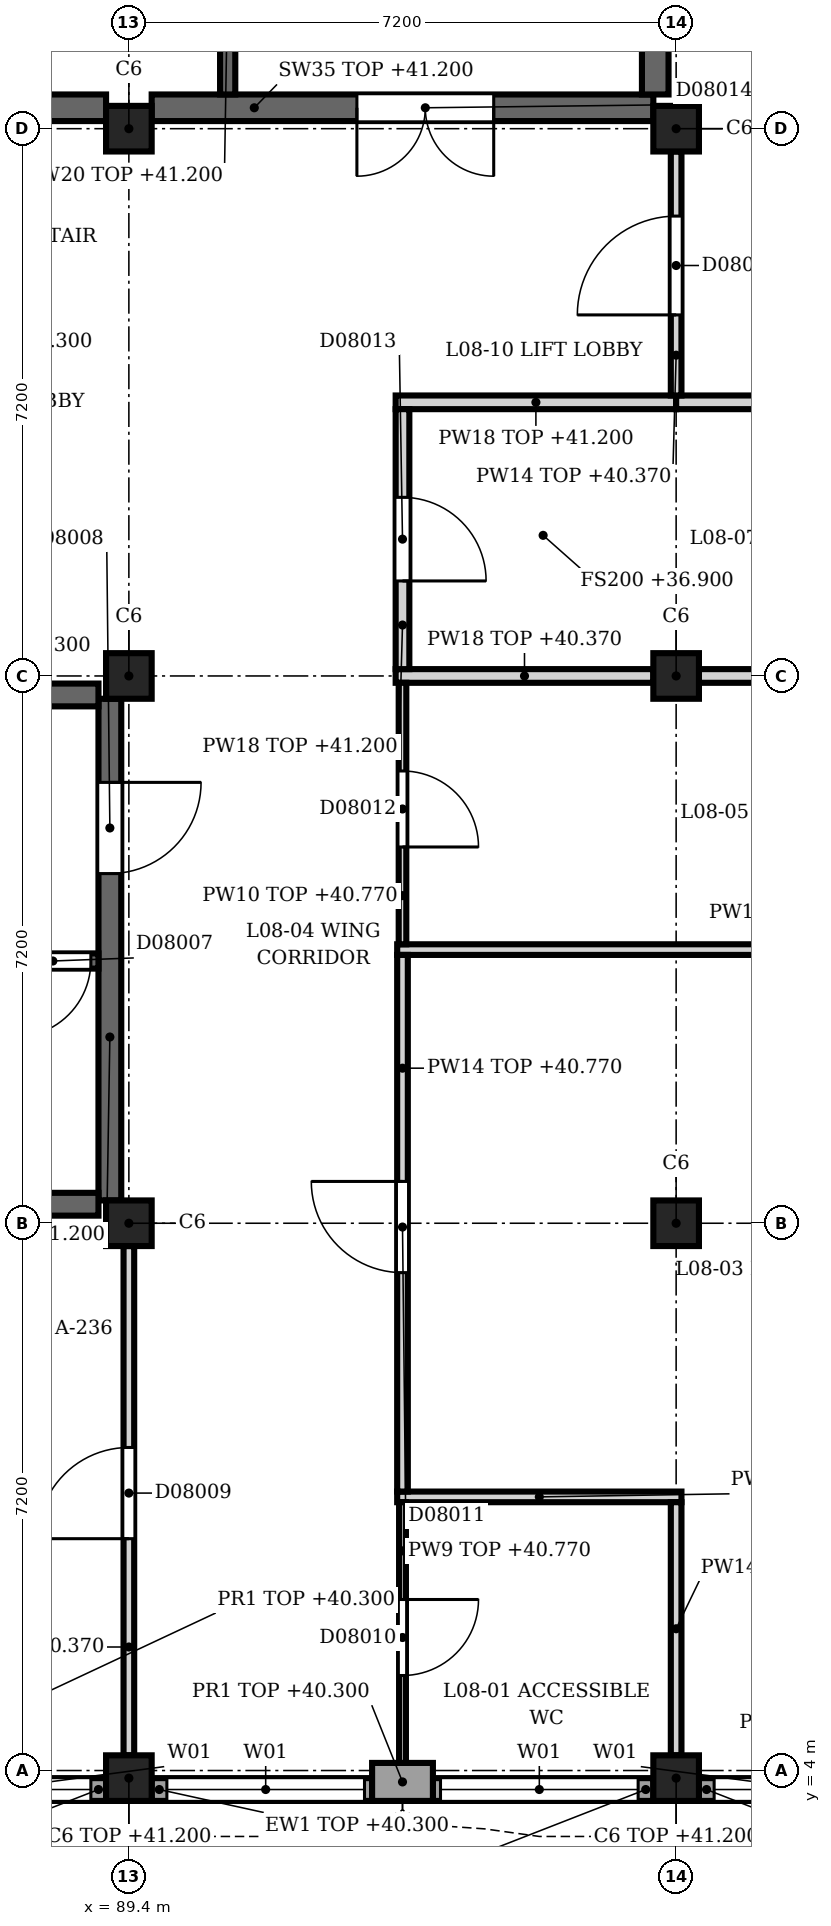
"""IFC4 building model, lengths in metres.
Left out: names, types, materials, properties, quantities, classifications, styles, units other than length and angle.
Written with IfcOpenShell. Run it as: python <this file> out.ifc"""

import sys

from ifc_helpers import new_model, si_unit, direction, frame, frame_2d, origin, origin_2d, place, context, subcontext, project, spatial, rectangle, extrude, element, fill, save


model = new_model("IFC4")
c1 = context("Model", 3, precision=1e-05, world=origin(), true_north=direction((0.0, 1.0)))
c2 = subcontext(c1, "Body", "Model", "MODEL_VIEW")
j1 = project(units=[si_unit("LENGTHUNIT", "METRE"), si_unit("PLANEANGLEUNIT", "RADIAN")], contexts=[c1])
p1 = place(None, origin())
s1 = spatial("IfcSite", under=j1, at=p1, CompositionType="ELEMENT")
p2 = place(p1, origin())
s2 = spatial("IfcBuilding", under=s1, at=p2, CompositionType="ELEMENT")
p3 = place(p2, frame((0.0, 0.0, 36.9)))
s3 = spatial("IfcBuildingStorey", under=s2, at=p3, CompositionType="ELEMENT", Elevation=36.9)
p4 = place(p3, frame((89.4, 3.9, 0.0), z_axis=(0.0, 0.0, 1.0), x_axis=(1.0, 0.0, 0.0)))
e1 = element("IfcColumn", 1, at=p4, inside=s3, PredefinedType="COLUMN", context=c2, shape_type="SweptSolid", body=[
    extrude(rectangle(XDim=0.6, YDim=0.6, at=origin_2d()), origin(), (0.0, 0.0, 1.0), 4.3),
])
for number, where, z_axis, x_axis in (
    (2, (89.4, 11.2, 0.0), (0.0, 0.0, 1.0), (1.0, 0.0, 0.0)),
    (3, (89.4, 18.4, 0.0), (0.0, 0.0, 1.0), (1.0, 0.0, 0.0)),
    (4, (89.4, 25.6, 0.0), (0.0, 0.0, 1.0), (1.0, 0.0, 0.0)),
):
    element("IfcColumn", number, at=place(p3, frame(where, z_axis=z_axis, x_axis=x_axis)), inside=s3, PredefinedType="COLUMN", context=c2, shape_type="SweptSolid", body=[
        extrude(rectangle(XDim=0.6, YDim=0.6, at=origin_2d()), origin(), (0.0, 0.0, 1.0), 4.5),
    ])
p5 = place(p3, frame((96.6, 3.9, 0.0), z_axis=(0.0, 0.0, 1.0), x_axis=(1.0, 0.0, 0.0)))
e5 = element("IfcColumn", 5, at=p5, inside=s3, PredefinedType="COLUMN", context=c2, shape_type="SweptSolid", body=[
    extrude(rectangle(XDim=0.6, YDim=0.6, at=origin_2d()), origin(), (0.0, 0.0, 1.0), 4.3),
])
for number, where, z_axis, x_axis in (
    (6, (96.6, 11.2, 0.0), (0.0, 0.0, 1.0), (1.0, 0.0, 0.0)),
    (7, (96.6, 18.4, 0.0), (0.0, 0.0, 1.0), (1.0, 0.0, 0.0)),
    (8, (96.6, 25.6, 0.0), (0.0, 0.0, 1.0), (1.0, 0.0, 0.0)),
):
    element("IfcColumn", number, at=place(p3, frame(where, z_axis=z_axis, x_axis=x_axis)), inside=s3, PredefinedType="COLUMN", context=c2, shape_type="SweptSolid", body=[
        extrude(rectangle(XDim=0.6, YDim=0.6, at=origin_2d()), origin(), (0.0, 0.0, 1.0), 4.5),
    ])
p6 = place(p3, frame((93.4, 3.85, 0.0), z_axis=(0.0, 0.0, 1.0), x_axis=(-1.0, 0.0, 0.0)))
e9 = element("IfcWall", 9, at=p6, inside=s3, PredefinedType="SOLIDWALL", context=c2, shape_type="SweptSolid", body=[
    extrude(rectangle(XDim=0.8, YDim=0.5, at=frame_2d((0.4, 0.0))), origin(), (0.0, 0.0, 1.0), 3.4),
])
p7 = place(p3, frame((99.8, 3.75, 0.0), z_axis=(0.0, 0.0, 1.0), x_axis=(-1.0, 0.0, 0.0)))
e10 = element("IfcWall", 10, at=p7, inside=s3, PredefinedType="SOLIDWALL", context=c2, shape_type="SweptSolid", body=[
    extrude(rectangle(XDim=2.9, YDim=0.3, at=frame_2d((1.45, 0.0))), origin(), (0.0, 0.0, 1.0), 3.4),
])
p8 = place(p7, frame((0.1, 0.0, 0.9)))
e11 = element("IfcOpeningElement", 11, at=p8, cuts=e10, PredefinedType="OPENING", context=c2, shape_type="SweptSolid", body=[
    extrude(rectangle(XDim=2.6, YDim=2.4, at=frame_2d((1.3, 1.2))), frame((0.0, 0.16, 0.0), z_axis=(0.0, -1.0, 0.0), x_axis=(1.0, 0.0, 0.0)), (0.0, 0.0, 1.0), 0.32),
])
p9 = place(p3, frame((96.3, 3.75, 0.0), z_axis=(0.0, 0.0, 1.0), x_axis=(-1.0, 0.0, 0.0)))
e12 = element("IfcWall", 12, at=p9, inside=s3, PredefinedType="SOLIDWALL", context=c2, shape_type="SweptSolid", body=[
    extrude(rectangle(XDim=2.9, YDim=0.3, at=frame_2d((1.45, 0.0))), origin(), (0.0, 0.0, 1.0), 3.4),
])
p10 = place(p9, frame((0.2, 0.0, 0.9)))
e13 = element("IfcOpeningElement", 13, at=p10, cuts=e12, PredefinedType="OPENING", context=c2, shape_type="SweptSolid", body=[
    extrude(rectangle(XDim=2.6, YDim=2.4, at=frame_2d((1.3, 1.2))), frame((0.0, 0.16, 0.0), z_axis=(0.0, -1.0, 0.0), x_axis=(1.0, 0.0, 0.0)), (0.0, 0.0, 1.0), 0.32),
])
p11 = place(p3, frame((92.6, 3.75, 0.0), z_axis=(0.0, 0.0, 1.0), x_axis=(-1.0, 0.0, 0.0)))
e14 = element("IfcWall", 14, at=p11, inside=s3, PredefinedType="SOLIDWALL", context=c2, shape_type="SweptSolid", body=[
    extrude(rectangle(XDim=2.9, YDim=0.3, at=frame_2d((1.45, 0.0))), origin(), (0.0, 0.0, 1.0), 3.4),
])
p12 = place(p11, frame((0.1, 0.0, 0.9)))
e15 = element("IfcOpeningElement", 15, at=p12, cuts=e14, PredefinedType="OPENING", context=c2, shape_type="SweptSolid", body=[
    extrude(rectangle(XDim=2.6, YDim=2.4, at=frame_2d((1.3, 1.2))), frame((0.0, 0.16, 0.0), z_axis=(0.0, -1.0, 0.0), x_axis=(1.0, 0.0, 0.0)), (0.0, 0.0, 1.0), 0.32),
])
p13 = place(p3, frame((89.1, 3.75, 0.0), z_axis=(0.0, 0.0, 1.0), x_axis=(-1.0, 0.0, 0.0)))
e16 = element("IfcWall", 16, at=p13, inside=s3, PredefinedType="SOLIDWALL", context=c2, shape_type="SweptSolid", body=[
    extrude(rectangle(XDim=2.9, YDim=0.3, at=frame_2d((1.45, 0.0))), origin(), (0.0, 0.0, 1.0), 3.4),
])
p14 = place(p13, frame((0.2, 0.0, 0.9)))
e17 = element("IfcOpeningElement", 17, at=p14, cuts=e16, PredefinedType="OPENING", context=c2, shape_type="SweptSolid", body=[
    extrude(rectangle(XDim=2.6, YDim=2.4, at=frame_2d((1.3, 1.2))), frame((0.0, 0.16, 0.0), z_axis=(0.0, -1.0, 0.0), x_axis=(1.0, 0.0, 0.0)), (0.0, 0.0, 1.0), 0.32),
])
p15 = place(p3, frame((82.4, 25.875, 0.0), z_axis=(0.0, 0.0, 1.0), x_axis=(1.0, 0.0, 0.0)))
e18 = element("IfcWall", 18, at=p15, inside=s3, PredefinedType="SHEAR", context=c2, shape_type="SweptSolid", body=[
    extrude(rectangle(XDim=6.7, YDim=0.35, at=frame_2d((3.35, 0.0))), origin(), (0.0, 0.0, 1.0), 4.3),
])
p16 = place(p15, frame((4.0, 0.0, 0.0)))
e19 = element("IfcOpeningElement", 19, at=p16, cuts=e18, PredefinedType="OPENING", context=c2, shape_type="SweptSolid", body=[
    extrude(rectangle(XDim=1.2, YDim=2.1, at=frame_2d((0.6, 1.05))), frame((0.0, 0.185, 0.0), z_axis=(0.0, -1.0, 0.0), x_axis=(1.0, 0.0, 0.0)), (0.0, 0.0, 1.0), 0.37),
])
p17 = place(p3, frame((89.7, 25.875, 0.0), z_axis=(0.0, 0.0, 1.0), x_axis=(1.0, 0.0, 0.0)))
e20 = element("IfcWall", 20, at=p17, inside=s3, PredefinedType="SHEAR", context=c2, shape_type="SweptSolid", body=[
    extrude(rectangle(XDim=6.6, YDim=0.35, at=frame_2d((3.3, 0.0))), origin(), (0.0, 0.0, 1.0), 4.3),
])
p18 = place(p17, frame((2.7, 0.0, 0.0)))
e21 = element("IfcOpeningElement", 21, at=p18, cuts=e20, PredefinedType="OPENING", context=c2, shape_type="SweptSolid", body=[
    extrude(rectangle(XDim=1.8, YDim=2.1, at=frame_2d((0.9, 1.05))), frame((0.0, 0.185, 0.0), z_axis=(0.0, -1.0, 0.0), x_axis=(1.0, 0.0, 0.0)), (0.0, 0.0, 1.0), 0.37),
])
p19 = place(p3, frame((96.325, 26.05, 0.0), z_axis=(0.0, 0.0, 1.0), x_axis=(0.0, 1.0, 0.0)))
e22 = element("IfcWall", 22, at=p19, inside=s3, PredefinedType="SHEAR", context=c2, shape_type="SweptSolid", body=[
    extrude(rectangle(XDim=6.3, YDim=0.35, at=frame_2d((3.15, 0.0))), origin(), (0.0, 0.0, 1.0), 4.3),
])
p20 = place(p3, frame((90.7, 26.05, 0.0), z_axis=(0.0, 0.0, 1.0), x_axis=(0.0, 1.0, 0.0)))
e23 = element("IfcWall", 23, at=p20, inside=s3, PredefinedType="SHEAR", context=c2, shape_type="SweptSolid", body=[
    extrude(rectangle(XDim=3.05, YDim=0.2, at=frame_2d((1.525, 0.0))), origin(), (0.0, 0.0, 1.0), 4.3),
])
p21 = place(p3, frame((89.15, 11.5, 0.0), z_axis=(0.0, 0.0, 1.0), x_axis=(0.0, 1.0, 0.0)))
e24 = element("IfcWall", 24, at=p21, inside=s3, PredefinedType="SHEAR", context=c2, shape_type="SweptSolid", body=[
    extrude(rectangle(XDim=6.6, YDim=0.3, at=frame_2d((3.3, 0.0))), origin(), (0.0, 0.0, 1.0), 4.3),
])
p22 = place(p21, frame((4.3, 0.0, 0.0)))
e25 = element("IfcOpeningElement", 25, at=p22, cuts=e24, PredefinedType="OPENING", context=c2, shape_type="SweptSolid", body=[
    extrude(rectangle(XDim=1.2, YDim=2.1, at=frame_2d((0.6, 1.05))), frame((0.0, 0.16, 0.0), z_axis=(0.0, -1.0, 0.0), x_axis=(1.0, 0.0, 0.0)), (0.0, 0.0, 1.0), 0.32),
])
for number, where, z_axis, x_axis in (
    (26, (82.6, 11.45, 0.0), (0.0, 0.0, 1.0), (1.0, 0.0, 0.0)),
    (27, (82.6, 18.15, 0.0), (0.0, 0.0, 1.0), (1.0, 0.0, 0.0)),
):
    element("IfcWall", number, at=place(p3, frame(where, z_axis=z_axis, x_axis=x_axis)), inside=s3, PredefinedType="SHEAR", context=c2, shape_type="SweptSolid", body=[
        extrude(rectangle(XDim=6.4, YDim=0.3, at=frame_2d((3.2, 0.0))), origin(), (0.0, 0.0, 1.0), 4.3),
    ])
p23 = place(p3, frame((89.0, 14.65, 0.0), z_axis=(0.0, 0.0, 1.0), x_axis=(-1.0, 0.0, 0.0)))
e28 = element("IfcWall", 28, at=p23, inside=s3, PredefinedType="SHEAR", context=c2, shape_type="SweptSolid", body=[
    extrude(rectangle(XDim=6.4, YDim=0.2, at=frame_2d((3.2, 0.0))), origin(), (0.0, 0.0, 1.0), 4.3),
])
p24 = place(p23, frame((0.1, 0.0, 0.0)))
e29 = element("IfcOpeningElement", 29, at=p24, cuts=e28, PredefinedType="OPENING", context=c2, shape_type="SweptSolid", body=[
    extrude(rectangle(XDim=1.0, YDim=2.1, at=frame_2d((0.5, 1.05))), frame((0.0, 0.11, 0.0), z_axis=(0.0, -1.0, 0.0), x_axis=(1.0, 0.0, 0.0)), (0.0, 0.0, 1.0), 0.22),
])
p25 = place(p3, frame((92.93, 7.6, 0.0), z_axis=(0.0, 0.0, 1.0), x_axis=(1.0, 0.0, 0.0)))
e30 = element("IfcWall", 30, at=p25, inside=s3, PredefinedType="PARTITIONING", context=c2, shape_type="SweptSolid", body=[
    extrude(rectangle(XDim=3.74, YDim=0.14, at=frame_2d((1.87, 0.0))), origin(), (0.0, 0.0, 1.0), 4.3),
])
p26 = place(p3, frame((92.93, 14.8, 0.0), z_axis=(0.0, 0.0, 1.0), x_axis=(1.0, 0.0, 0.0)))
e31 = element("IfcWall", 31, at=p26, inside=s3, PredefinedType="PARTITIONING", context=c2, shape_type="SweptSolid", body=[
    extrude(rectangle(XDim=10.77, YDim=0.14, at=frame_2d((5.385, 0.0))), origin(), (0.0, 0.0, 1.0), 4.3),
])
p27 = place(p3, frame((92.91, 18.4, 0.0), z_axis=(0.0, 0.0, 1.0), x_axis=(1.0, 0.0, 0.0)))
e32 = element("IfcWall", 32, at=p27, inside=s3, PredefinedType="PARTITIONING", context=c2, shape_type="SweptSolid", body=[
    extrude(rectangle(XDim=3.39, YDim=0.18, at=frame_2d((1.695, 0.0))), origin(), (0.0, 0.0, 1.0), 3.47),
])
p28 = place(p3, frame((96.9, 18.4, 0.0), z_axis=(0.0, 0.0, 1.0), x_axis=(1.0, 0.0, 0.0)))
e33 = element("IfcWall", 33, at=p28, inside=s3, PredefinedType="PARTITIONING", context=c2, shape_type="SweptSolid", body=[
    extrude(rectangle(XDim=6.7, YDim=0.18, at=frame_2d((3.35, 0.0))), origin(), (0.0, 0.0, 1.0), 3.47),
])
p29 = place(p3, frame((92.91, 22.0, 0.0), z_axis=(0.0, 0.0, 1.0), x_axis=(1.0, 0.0, 0.0)))
e34 = element("IfcWall", 34, at=p29, inside=s3, PredefinedType="PARTITIONING", context=c2, shape_type="SweptSolid", body=[
    extrude(rectangle(XDim=3.69, YDim=0.18, at=frame_2d((1.845, 0.0))), origin(), (0.0, 0.0, 1.0), 4.3),
])
p30 = place(p3, frame((96.6, 22.0, 0.0), z_axis=(0.0, 0.0, 1.0), x_axis=(1.0, 0.0, 0.0)))
e35 = element("IfcWall", 35, at=p30, inside=s3, PredefinedType="PARTITIONING", context=c2, shape_type="SweptSolid", body=[
    extrude(rectangle(XDim=7.1, YDim=0.18, at=frame_2d((3.55, 0.0))), origin(), (0.0, 0.0, 1.0), 4.3),
])
p31 = place(p3, frame((89.4, 4.2, 0.0), z_axis=(0.0, 0.0, 1.0), x_axis=(0.0, 1.0, 0.0)))
e36 = element("IfcWall", 36, at=p31, inside=s3, PredefinedType="PARTITIONING", context=c2, shape_type="SweptSolid", body=[
    extrude(rectangle(XDim=6.7, YDim=0.14, at=frame_2d((3.35, 0.0))), origin(), (0.0, 0.0, 1.0), 3.47),
])
p32 = place(p31, frame((2.85, 0.0, 0.0)))
e37 = element("IfcOpeningElement", 37, at=p32, cuts=e36, PredefinedType="OPENING", context=c2, shape_type="SweptSolid", body=[
    extrude(rectangle(XDim=1.2, YDim=2.1, at=frame_2d((0.6, 1.05))), frame((0.0, 0.08, 0.0), z_axis=(0.0, -1.0, 0.0), x_axis=(1.0, 0.0, 0.0)), (0.0, 0.0, 1.0), 0.16),
])
p33 = place(p3, frame((93.0, 7.53, 0.0), z_axis=(0.0, 0.0, 1.0), x_axis=(0.0, -1.0, 0.0)))
e38 = element("IfcWall", 38, at=p33, inside=s3, PredefinedType="PARTITIONING", context=c2, shape_type="SweptSolid", body=[
    extrude(rectangle(XDim=3.43, YDim=0.09, at=frame_2d((1.715, 0.0))), origin(), (0.0, 0.0, 1.0), 3.87),
])
p34 = place(p33, frame((1.28, 0.0, 0.0)))
e39 = element("IfcOpeningElement", 39, at=p34, cuts=e38, PredefinedType="OPENING", context=c2, shape_type="SweptSolid", body=[
    extrude(rectangle(XDim=1.0, YDim=2.2, at=frame_2d((0.5, 1.1))), frame((0.0, 0.055, 0.0), z_axis=(0.0, -1.0, 0.0), x_axis=(1.0, 0.0, 0.0)), (0.0, 0.0, 1.0), 0.11),
])
p35 = place(p3, frame((93.0, 14.73, 0.0), z_axis=(0.0, 0.0, 1.0), x_axis=(0.0, -1.0, 0.0)))
e40 = element("IfcWall", 40, at=p35, inside=s3, PredefinedType="PARTITIONING", context=c2, shape_type="SweptSolid", body=[
    extrude(rectangle(XDim=7.06, YDim=0.14, at=frame_2d((3.53, 0.0))), origin(), (0.0, 0.0, 1.0), 3.87),
])
p36 = place(p35, frame((2.98, 0.0, 0.0)))
e41 = element("IfcOpeningElement", 41, at=p36, cuts=e40, PredefinedType="OPENING", context=c2, shape_type="SweptSolid", body=[
    extrude(rectangle(XDim=1.2, YDim=2.1, at=frame_2d((0.6, 1.05))), frame((0.0, 0.08, 0.0), z_axis=(0.0, -1.0, 0.0), x_axis=(1.0, 0.0, 0.0)), (0.0, 0.0, 1.0), 0.16),
])
p37 = place(p3, frame((93.0, 18.31, 0.0), z_axis=(0.0, 0.0, 1.0), x_axis=(0.0, -1.0, 0.0)))
e42 = element("IfcWall", 42, at=p37, inside=s3, PredefinedType="PARTITIONING", context=c2, shape_type="SweptSolid", body=[
    extrude(rectangle(XDim=3.44, YDim=0.1, at=frame_2d((1.72, 0.0))), origin(), (0.0, 0.0, 1.0), 3.87),
])
p38 = place(p37, frame((1.16, 0.0, 0.0)))
e43 = element("IfcOpeningElement", 43, at=p38, cuts=e42, PredefinedType="OPENING", context=c2, shape_type="SweptSolid", body=[
    extrude(rectangle(XDim=1.0, YDim=2.1, at=frame_2d((0.5, 1.05))), frame((0.0, 0.06, 0.0), z_axis=(0.0, -1.0, 0.0), x_axis=(1.0, 0.0, 0.0)), (0.0, 0.0, 1.0), 0.12),
])
p39 = place(p3, frame((93.0, 21.91, 0.0), z_axis=(0.0, 0.0, 1.0), x_axis=(0.0, -1.0, 0.0)))
e44 = element("IfcWall", 44, at=p39, inside=s3, PredefinedType="PARTITIONING", context=c2, shape_type="SweptSolid", body=[
    extrude(rectangle(XDim=3.42, YDim=0.18, at=frame_2d((1.71, 0.0))), origin(), (0.0, 0.0, 1.0), 4.3),
])
p40 = place(p39, frame((1.16, 0.0, 0.0)))
e45 = element("IfcOpeningElement", 45, at=p40, cuts=e44, PredefinedType="OPENING", context=c2, shape_type="SweptSolid", body=[
    extrude(rectangle(XDim=1.1, YDim=2.3, at=frame_2d((0.55, 1.15))), frame((0.0, 0.1, 0.0), z_axis=(0.0, -1.0, 0.0), x_axis=(1.0, 0.0, 0.0)), (0.0, 0.0, 1.0), 0.2),
])
p41 = place(p3, frame((96.6, 4.2, 0.0), z_axis=(0.0, 0.0, 1.0), x_axis=(0.0, 1.0, 0.0)))
e46 = element("IfcWall", 46, at=p41, inside=s3, PredefinedType="PARTITIONING", context=c2, shape_type="SweptSolid", body=[
    extrude(rectangle(XDim=3.33, YDim=0.14, at=frame_2d((1.665, 0.0))), origin(), (0.0, 0.0, 1.0), 3.47),
])
p42 = place(p3, frame((96.6, 25.3, 0.0), z_axis=(0.0, 0.0, 1.0), x_axis=(0.0, -1.0, 0.0)))
e47 = element("IfcWall", 47, at=p42, inside=s3, PredefinedType="PARTITIONING", context=c2, shape_type="SweptSolid", body=[
    extrude(rectangle(XDim=3.21, YDim=0.14, at=frame_2d((1.605, 0.0))), origin(), (0.0, 0.0, 1.0), 3.47),
])
p43 = place(p42, frame((0.85, 0.0, 0.0)))
e48 = element("IfcOpeningElement", 48, at=p43, cuts=e47, PredefinedType="OPENING", context=c2, shape_type="SweptSolid", body=[
    extrude(rectangle(XDim=1.3, YDim=2.1, at=frame_2d((0.65, 1.05))), frame((0.0, 0.08, 0.0), z_axis=(0.0, -1.0, 0.0), x_axis=(1.0, 0.0, 0.0)), (0.0, 0.0, 1.0), 0.16),
])
p44 = place(p8, origin())
e49 = element("IfcWindow", 49, at=p44, inside=s3, PartitioningType="SINGLE_PANEL", PredefinedType="WINDOW", context=c2, shape_type="SweptSolid", body=[
    extrude(rectangle(XDim=2.6, YDim=2.4, at=frame_2d((1.3, 1.2))), frame((0.0, 0.03, 0.0), z_axis=(0.0, -1.0, 0.0), x_axis=(1.0, 0.0, 0.0)), (0.0, 0.0, 1.0), 0.06),
])
fill(e11, e49)
p45 = place(p10, origin())
e50 = element("IfcWindow", 50, at=p45, inside=s3, PartitioningType="SINGLE_PANEL", PredefinedType="WINDOW", context=c2, shape_type="SweptSolid", body=[
    extrude(rectangle(XDim=2.6, YDim=2.4, at=frame_2d((1.3, 1.2))), frame((0.0, 0.03, 0.0), z_axis=(0.0, -1.0, 0.0), x_axis=(1.0, 0.0, 0.0)), (0.0, 0.0, 1.0), 0.06),
])
fill(e13, e50)
p46 = place(p12, origin())
e51 = element("IfcWindow", 51, at=p46, inside=s3, PartitioningType="SINGLE_PANEL", PredefinedType="WINDOW", context=c2, shape_type="SweptSolid", body=[
    extrude(rectangle(XDim=2.6, YDim=2.4, at=frame_2d((1.3, 1.2))), frame((0.0, 0.03, 0.0), z_axis=(0.0, -1.0, 0.0), x_axis=(1.0, 0.0, 0.0)), (0.0, 0.0, 1.0), 0.06),
])
fill(e15, e51)
p47 = place(p14, origin())
e52 = element("IfcWindow", 52, at=p47, inside=s3, PartitioningType="SINGLE_PANEL", PredefinedType="WINDOW", context=c2, shape_type="SweptSolid", body=[
    extrude(rectangle(XDim=2.6, YDim=2.4, at=frame_2d((1.3, 1.2))), frame((0.0, 0.03, 0.0), z_axis=(0.0, -1.0, 0.0), x_axis=(1.0, 0.0, 0.0)), (0.0, 0.0, 1.0), 0.06),
])
fill(e17, e52)
p48 = place(p18, origin())
e53 = element("IfcDoor", 53, at=p48, inside=s3, OperationType="SINGLE_SWING_LEFT", PredefinedType="DOOR", context=c2, shape_type="SweptSolid", body=[
    extrude(rectangle(XDim=1.8, YDim=2.1, at=frame_2d((0.9, 1.05))), frame((0.0, 0.025, 0.0), z_axis=(0.0, -1.0, 0.0), x_axis=(1.0, 0.0, 0.0)), (0.0, 0.0, 1.0), 0.05),
])
fill(e21, e53)
p49 = place(p22, origin())
e54 = element("IfcDoor", 54, at=p49, inside=s3, OperationType="SINGLE_SWING_RIGHT", PredefinedType="DOOR", context=c2, shape_type="SweptSolid", body=[
    extrude(rectangle(XDim=1.2, YDim=2.1, at=frame_2d((0.6, 1.05))), frame((0.0, 0.025, 0.0), z_axis=(0.0, -1.0, 0.0), x_axis=(1.0, 0.0, 0.0)), (0.0, 0.0, 1.0), 0.05),
])
fill(e25, e54)
p50 = place(p24, origin())
e55 = element("IfcDoor", 55, at=p50, inside=s3, OperationType="SINGLE_SWING_LEFT", PredefinedType="DOOR", context=c2, shape_type="SweptSolid", body=[
    extrude(rectangle(XDim=1.0, YDim=2.1, at=frame_2d((0.5, 1.05))), frame((0.0, 0.025, 0.0), z_axis=(0.0, -1.0, 0.0), x_axis=(1.0, 0.0, 0.0)), (0.0, 0.0, 1.0), 0.05),
])
fill(e29, e55)
p51 = place(p32, origin())
e56 = element("IfcDoor", 56, at=p51, inside=s3, OperationType="SINGLE_SWING_RIGHT", PredefinedType="DOOR", context=c2, shape_type="SweptSolid", body=[
    extrude(rectangle(XDim=1.2, YDim=2.1, at=frame_2d((0.6, 1.05))), frame((0.0, 0.025, 0.0), z_axis=(0.0, -1.0, 0.0), x_axis=(1.0, 0.0, 0.0)), (0.0, 0.0, 1.0), 0.05),
])
fill(e37, e56)
p52 = place(p34, origin())
e57 = element("IfcDoor", 57, at=p52, inside=s3, OperationType="SINGLE_SWING_RIGHT", PredefinedType="DOOR", context=c2, shape_type="SweptSolid", body=[
    extrude(rectangle(XDim=1.0, YDim=2.2, at=frame_2d((0.5, 1.1))), frame((0.0, 0.025, 0.0), z_axis=(0.0, -1.0, 0.0), x_axis=(1.0, 0.0, 0.0)), (0.0, 0.0, 1.0), 0.05),
])
fill(e39, e57)
p53 = place(p36, origin())
e58 = element("IfcDoor", 58, at=p53, inside=s3, OperationType="SINGLE_SWING_RIGHT", PredefinedType="DOOR", context=c2, shape_type="SweptSolid", body=[
    extrude(rectangle(XDim=1.2, YDim=2.1, at=frame_2d((0.6, 1.05))), frame((0.0, 0.025, 0.0), z_axis=(0.0, -1.0, 0.0), x_axis=(1.0, 0.0, 0.0)), (0.0, 0.0, 1.0), 0.05),
])
fill(e41, e58)
p54 = place(p38, origin())
e59 = element("IfcDoor", 59, at=p54, inside=s3, OperationType="SINGLE_SWING_LEFT", PredefinedType="DOOR", context=c2, shape_type="SweptSolid", body=[
    extrude(rectangle(XDim=1.0, YDim=2.1, at=frame_2d((0.5, 1.05))), frame((0.0, 0.025, 0.0), z_axis=(0.0, -1.0, 0.0), x_axis=(1.0, 0.0, 0.0)), (0.0, 0.0, 1.0), 0.05),
])
fill(e43, e59)
p55 = place(p40, origin())
e60 = element("IfcDoor", 60, at=p55, inside=s3, OperationType="SINGLE_SWING_RIGHT", PredefinedType="DOOR", context=c2, shape_type="SweptSolid", body=[
    extrude(rectangle(XDim=1.1, YDim=2.3, at=frame_2d((0.55, 1.15))), frame((0.0, 0.025, 0.0), z_axis=(0.0, -1.0, 0.0), x_axis=(1.0, 0.0, 0.0)), (0.0, 0.0, 1.0), 0.05),
])
fill(e45, e60)
p56 = place(p43, origin())
e61 = element("IfcDoor", 61, at=p56, inside=s3, OperationType="SINGLE_SWING_LEFT", PredefinedType="DOOR", context=c2, shape_type="SweptSolid", body=[
    extrude(rectangle(XDim=1.3, YDim=2.1, at=frame_2d((0.65, 1.05))), frame((0.0, 0.025, 0.0), z_axis=(0.0, -1.0, 0.0), x_axis=(1.0, 0.0, 0.0)), (0.0, 0.0, 1.0), 0.05),
])
fill(e48, e61)
save(model, sys.argv[1])
